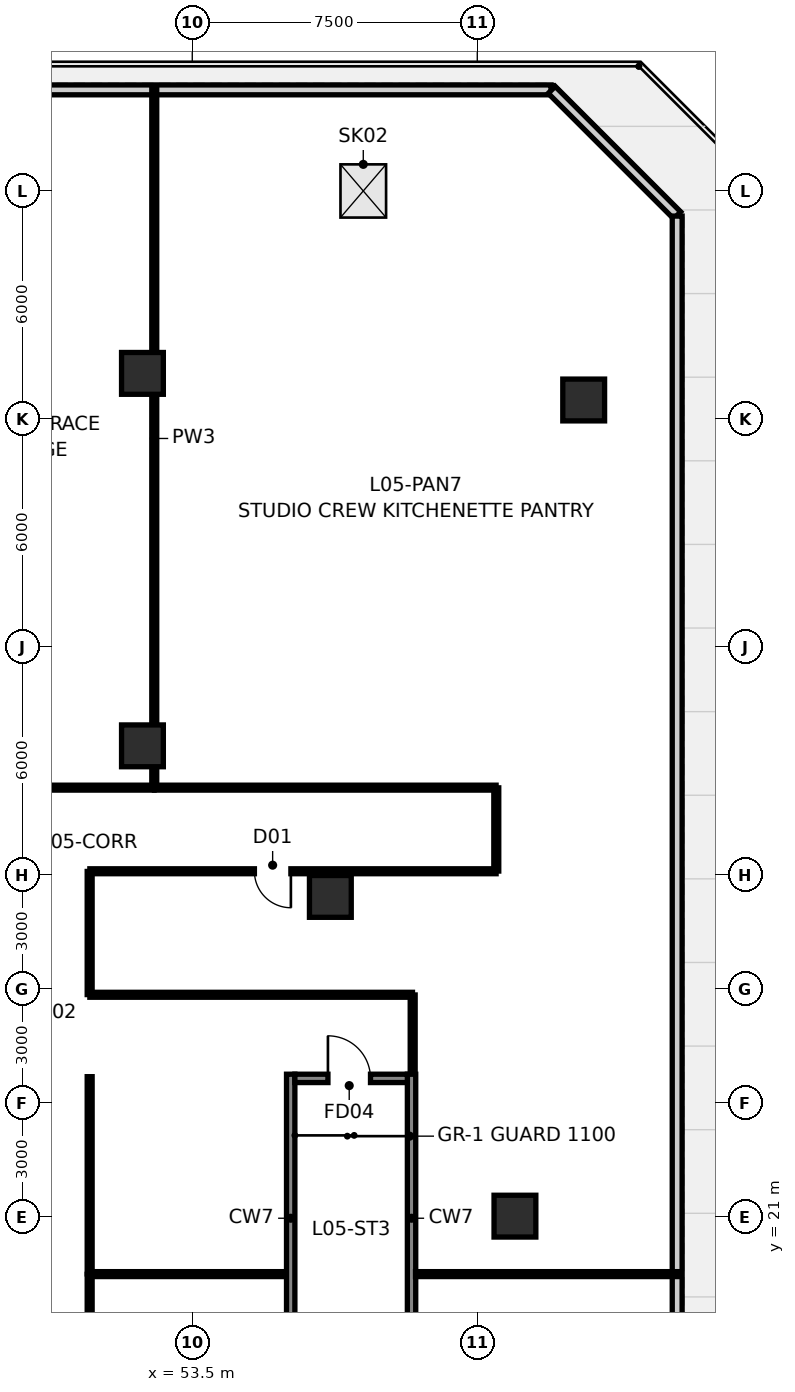
"""IFC4 building model, lengths in metres.
Left out: names, types, materials, properties, quantities, classifications, styles, units other than length and angle.
Written with IfcOpenShell. Run it as: python <this file> out.ifc"""

import sys

from ifc_helpers import new_model, si_unit, direction, frame, frame_2d, origin, origin_2d, place, context, subcontext, project, spatial, rectangle, hollow_rectangle, extrude, source, transform, mapped, element, fill, save


model = new_model("IFC4")
c1 = context("Model", 3, precision=1e-05, world=origin(), true_north=direction((0.0, 1.0)))
c2 = subcontext(c1, "Body", "Model", "MODEL_VIEW")
j1 = project(units=[si_unit("LENGTHUNIT", "METRE"), si_unit("PLANEANGLEUNIT", "RADIAN")], contexts=[c1])
p1 = place(None, origin())
s1 = spatial("IfcSite", under=j1, at=p1, CompositionType="ELEMENT")
p2 = place(p1, origin())
s2 = spatial("IfcBuilding", under=s1, at=p2, CompositionType="ELEMENT")
p3 = place(p2, frame((0.0, 0.0, 23.1)))
s3 = spatial("IfcBuildingStorey", under=s2, at=p3, CompositionType="ELEMENT", Elevation=23.1)
for number, where, z_axis, x_axis in (
    (1, (56.09, 17.18, 0.0), (0.0, 0.0, 1.0), (0.0, 1.0, 0.0)),
    (2, (59.27, 17.18, 0.0), (0.0, 0.0, 1.0), (0.0, 1.0, 0.0)),
):
    element("IfcWall", number, at=place(p3, frame(where, z_axis=z_axis, x_axis=x_axis)), inside=s3, PredefinedType="SHEAR", context=c2, shape_type="SweptSolid", body=[
        extrude(rectangle(XDim=7.58, YDim=0.22, at=frame_2d((3.79, 0.0))), origin(), (0.0, 0.0, 1.0), 4.5),
    ])
p4 = place(p3, frame((56.2, 24.65, 0.0), z_axis=(0.0, 0.0, 1.0), x_axis=(1.0, 0.0, 0.0)))
e3 = element("IfcWall", 3, at=p4, inside=s3, PredefinedType="SHEAR", context=c2, shape_type="SweptSolid", body=[
    extrude(rectangle(XDim=2.96, YDim=0.22, at=frame_2d((1.48, 0.0))), origin(), (0.0, 0.0, 1.0), 4.5),
])
p5 = place(p4, frame((0.87, 0.0, 0.0)))
e4 = element("IfcOpeningElement", 4, at=p5, cuts=e3, PredefinedType="OPENING", context=c2, shape_type="SweptSolid", body=[
    extrude(rectangle(XDim=1.12, YDim=2.15, at=frame_2d((0.56, 1.075))), frame((0.0, 0.122, 0.0), z_axis=(0.0, -1.0, 0.0), x_axis=(1.0, 0.0, 0.0)), (0.0, 0.0, 1.0), 0.244),
])
m1 = source(origin(), c2, "Body", "SweptSolid", [
    extrude(hollow_rectangle(XDim=1.1, YDim=1.1, WallThickness=0.06, at=origin_2d()), origin(), (0.0, 0.0, 1.0), 4.501),
])
p6 = place(p3, frame((61.991, 21.025, 0.0), z_axis=(-0.010413674417, -0.021586679261, 0.999712744074), x_axis=(0.900673807124, -0.434495906954, 0.0)))
e5 = element("IfcColumn", 5, at=p6, inside=s3, PredefinedType="COLUMN", context=c2, shape_type="MappedRepresentation", body=[
    mapped(m1, transform((0.0, 0.0, 0.0), scale=1.0)),
])
m2 = source(origin(), c2, "Body", "SweptSolid", [
    extrude(hollow_rectangle(XDim=1.1, YDim=1.1, WallThickness=0.06, at=origin_2d()), origin(), (0.0, 0.0, 1.0), 4.501),
])
p7 = place(p3, frame((57.134, 29.438, 0.0), z_axis=(-0.01491662865, -0.013777540644, 0.999793815526), x_axis=(0.678501966239, -0.734598585494, 0.0)))
e6 = element("IfcColumn", 6, at=p7, inside=s3, PredefinedType="COLUMN", context=c2, shape_type="MappedRepresentation", body=[
    mapped(m2, transform((0.0, 0.0, 0.0), scale=1.0)),
])
m3 = source(origin(), c2, "Body", "SweptSolid", [
    extrude(hollow_rectangle(XDim=1.1, YDim=1.1, WallThickness=0.06, at=origin_2d()), origin(), (0.0, 0.0, 1.0), 4.25),
])
for number, where, z_axis, x_axis in (
    (7, (52.189, 33.4, 0.0), (0.0, 0.0, 1.0), (1.0, 0.0, 0.0)),
    (8, (52.189, 43.2, 0.0), (0.0, 0.0, 1.0), (1.0, 0.0, 0.0)),
    (9, (63.8, 42.5, 0.0), (0.0, 0.0, 1.0), (1.0, 0.0, 0.0)),
):
    element("IfcColumn", number, at=place(p3, frame(where, z_axis=z_axis, x_axis=x_axis)), inside=s3, PredefinedType="COLUMN", context=c2, shape_type="MappedRepresentation", body=[
        mapped(m3, transform((0.0, 0.0, 0.0), scale=1.0)),
    ])
p8 = place(p3, frame((13.061, 50.66, 0.0), z_axis=(0.0, 0.0, 1.0), x_axis=(1.0, 0.0, 0.0)))
e10 = element("IfcWall", 10, at=p8, inside=s3, PredefinedType="STANDARD", context=c2, shape_type="SweptSolid", body=[
    extrude(rectangle(XDim=49.878, YDim=0.26, at=frame_2d((24.939, 0.0))), origin(), (0.0, 0.0, 1.0), 4.25),
])
p9 = place(p3, frame((62.959, 50.66, 0.0), z_axis=(0.0, 0.0, 1.0), x_axis=(0.707106781187, -0.707106781187, 0.0)))
e11 = element("IfcWall", 11, at=p9, inside=s3, PredefinedType="STANDARD", context=c2, shape_type="SweptSolid", body=[
    extrude(rectangle(XDim=4.668, YDim=0.26, at=frame_2d((2.334, 0.0))), origin(), (0.0, 0.0, 1.0), 4.25),
])
p10 = place(p3, frame((66.26, 47.339, 0.0), z_axis=(0.0, 0.0, 1.0), x_axis=(0.0, -1.0, 0.0)))
e12 = element("IfcWall", 12, at=p10, inside=s3, PredefinedType="STANDARD", context=c2, shape_type="SweptSolid", body=[
    extrude(rectangle(XDim=40.878, YDim=0.26, at=frame_2d((20.439, 0.0))), origin(), (0.0, 0.0, 1.0), 4.25),
])
p11 = place(p3, frame((52.5, 32.305, 0.0), z_axis=(0.0, 0.0, 1.0), x_axis=(0.0, 1.0, 0.0)))
e13 = element("IfcWall", 13, at=p11, inside=s3, PredefinedType="PARTITIONING", context=c2, shape_type="SweptSolid", body=[
    extrude(rectangle(XDim=18.365, YDim=0.13, at=frame_2d((9.183, 0.0))), origin(), (0.0, 0.0, 1.0), 2.435),
])
p12 = place(p3, frame((61.495, 30.1, 0.0), z_axis=(0.0, 0.0, 1.0), x_axis=(-1.0, 0.0, 0.0)))
e14 = element("IfcWall", 14, at=p12, inside=s3, PredefinedType="PARTITIONING", context=c2, shape_type="SweptSolid", body=[
    extrude(rectangle(XDim=10.69, YDim=0.13, at=frame_2d((5.345, 0.0))), origin(), (0.0, 0.0, 1.0), 3.623),
])
p13 = place(p12, frame((5.4, 0.0, 0.0)))
e15 = element("IfcOpeningElement", 15, at=p13, cuts=e14, PredefinedType="OPENING", context=c2, shape_type="SweptSolid", body=[
    extrude(rectangle(XDim=0.96, YDim=2.15, at=frame_2d((0.48, 1.075))), frame((0.0, 0.077, 0.0), z_axis=(0.0, -1.0, 0.0), x_axis=(1.0, 0.0, 0.0)), (0.0, 0.0, 1.0), 0.154),
])
p14 = place(p3, frame((52.505, 32.3, 0.0), z_axis=(0.0, 0.0, 1.0), x_axis=(1.0, 0.0, 0.0)))
e16 = element("IfcWall", 16, at=p14, inside=s3, PredefinedType="PARTITIONING", context=c2, shape_type="SweptSolid", body=[
    extrude(rectangle(XDim=8.99, YDim=0.13, at=frame_2d((4.495, 0.0))), origin(), (0.0, 0.0, 1.0), 4.25),
])
p15 = place(p3, frame((44.005, 32.3, 0.0), z_axis=(0.0, 0.0, 1.0), x_axis=(1.0, 0.0, 0.0)))
e17 = element("IfcWall", 17, at=p15, inside=s3, PredefinedType="PARTITIONING", context=c2, shape_type="SweptSolid", body=[
    extrude(rectangle(XDim=8.49, YDim=0.13, at=frame_2d((4.245, 0.0))), origin(), (0.0, 0.0, 1.0), 4.25),
])
p16 = place(p15, frame((3.765, 0.0, 0.0)))
e18 = element("IfcOpeningElement", 18, at=p16, cuts=e17, PredefinedType="OPENING", context=c2, shape_type="SweptSolid", body=[
    extrude(rectangle(XDim=0.96, YDim=2.15, at=frame_2d((0.48, 1.075))), frame((0.0, 0.077, 0.0), z_axis=(0.0, -1.0, 0.0), x_axis=(1.0, 0.0, 0.0)), (0.0, 0.0, 1.0), 0.154),
])
p17 = place(p3, frame((50.805, 26.85, 0.0), z_axis=(0.0, 0.0, 1.0), x_axis=(1.0, 0.0, 0.0)))
e19 = element("IfcWall", 19, at=p17, inside=s3, PredefinedType="PARTITIONING", context=c2, shape_type="SweptSolid", body=[
    extrude(rectangle(XDim=8.49, YDim=0.13, at=frame_2d((4.245, 0.0))), origin(), (0.0, 0.0, 1.0), 4.25),
])
p18 = place(p3, frame((50.8, 12.205, 0.0), z_axis=(0.0, 0.0, 1.0), x_axis=(0.0, 1.0, 0.0)))
e20 = element("IfcWall", 20, at=p18, inside=s3, PredefinedType="PARTITIONING", context=c2, shape_type="SweptSolid", body=[
    extrude(rectangle(XDim=7.29, YDim=0.13, at=frame_2d((3.645, 0.0))), origin(), (0.0, 0.0, 1.0), 4.25),
])
p19 = place(p18, frame((3.165, 0.0, 0.0)))
e21 = element("IfcOpeningElement", 21, at=p19, cuts=e20, PredefinedType="OPENING", context=c2, shape_type="SweptSolid", body=[
    extrude(rectangle(XDim=0.96, YDim=2.15, at=frame_2d((0.48, 1.075))), frame((0.0, 0.077, 0.0), z_axis=(0.0, -1.0, 0.0), x_axis=(1.0, 0.0, 0.0)), (0.0, 0.0, 1.0), 0.154),
])
p20 = place(p3, frame((59.375, 19.5, 0.0), z_axis=(0.0, 0.0, 1.0), x_axis=(1.0, 0.0, 0.0)))
e22 = element("IfcWall", 22, at=p20, inside=s3, PredefinedType="PARTITIONING", context=c2, shape_type="SweptSolid", body=[
    extrude(rectangle(XDim=6.895, YDim=0.13, at=frame_2d((3.448, 0.0))), origin(), (0.0, 0.0, 1.0), 4.25),
])
p21 = place(p3, frame((50.805, 19.5, 0.0), z_axis=(0.0, 0.0, 1.0), x_axis=(1.0, 0.0, 0.0)))
e23 = element("IfcWall", 23, at=p21, inside=s3, PredefinedType="PARTITIONING", context=c2, shape_type="SweptSolid", body=[
    extrude(rectangle(XDim=5.17, YDim=0.13, at=frame_2d((2.585, 0.0))), origin(), (0.0, 0.0, 1.0), 4.25),
])
p22 = place(p3, frame((50.8, 24.695, 0.0), z_axis=(0.0, 0.0, 1.0), x_axis=(0.0, -1.0, 0.0)))
e24 = element("IfcWall", 24, at=p22, inside=s3, PredefinedType="PARTITIONING", context=c2, shape_type="SweptSolid", body=[
    extrude(rectangle(XDim=5.19, YDim=0.13, at=frame_2d((2.595, 0.0))), origin(), (0.0, 0.0, 1.0), 4.25),
])
p23 = place(p3, frame((50.8, 30.095, 0.0), z_axis=(0.0, 0.0, 1.0), x_axis=(0.0, -1.0, 0.0)))
e25 = element("IfcWall", 25, at=p23, inside=s3, PredefinedType="PARTITIONING", context=c2, shape_type="SweptSolid", body=[
    extrude(rectangle(XDim=3.24, YDim=0.13, at=frame_2d((1.62, 0.0))), origin(), (0.0, 0.0, 1.0), 4.25),
])
p24 = place(p3, frame((61.5, 32.295, 0.0), z_axis=(0.0, 0.0, 1.0), x_axis=(0.0, -1.0, 0.0)))
e26 = element("IfcWall", 26, at=p24, inside=s3, PredefinedType="PARTITIONING", context=c2, shape_type="SweptSolid", body=[
    extrude(rectangle(XDim=2.19, YDim=0.13, at=frame_2d((1.095, 0.0))), origin(), (0.0, 0.0, 1.0), 4.25),
])
p25 = place(p3, frame((59.3, 26.845, 0.0), z_axis=(0.0, 0.0, 1.0), x_axis=(0.0, -1.0, 0.0)))
e27 = element("IfcWall", 27, at=p25, inside=s3, PredefinedType="PARTITIONING", context=c2, shape_type="SweptSolid", body=[
    extrude(rectangle(XDim=2.07, YDim=0.13, at=frame_2d((1.035, 0.0))), origin(), (0.0, 0.0, 1.0), 4.25),
])
p26 = place(p3, frame((0.0, 0.0, -0.45)))
p27 = place(p26, frame((58.0, 48.0, 0.0)))
p28 = place(p27, frame((0.0, 0.0, 0.4)))
e28 = element("IfcWindow", 28, at=p28, inside=s3, PartitioningType="SINGLE_PANEL", PredefinedType="SKYLIGHT", context=c2, shape_type="SweptSolid", body=[
    extrude(rectangle(XDim=1.2, YDim=1.4, at=origin_2d()), origin(), (0.0, 0.0, 1.0), 0.05),
])
p29 = place(p5, origin())
e29 = element("IfcDoor", 29, at=p29, inside=s3, OperationType="SINGLE_SWING_LEFT", PredefinedType="DOOR", context=c2, shape_type="SweptSolid", body=[
    extrude(rectangle(XDim=1.12, YDim=2.15, at=frame_2d((0.56, 1.075))), frame((0.0, 0.025, 0.0), z_axis=(0.0, -1.0, 0.0), x_axis=(1.0, 0.0, 0.0)), (0.0, 0.0, 1.0), 0.05),
])
fill(e4, e29)
p30 = place(p13, origin())
e30 = element("IfcDoor", 30, at=p30, inside=s3, OperationType="SINGLE_SWING_LEFT", PredefinedType="DOOR", context=c2, shape_type="SweptSolid", body=[
    extrude(rectangle(XDim=0.96, YDim=2.15, at=frame_2d((0.48, 1.075))), frame((0.0, 0.025, 0.0), z_axis=(0.0, -1.0, 0.0), x_axis=(1.0, 0.0, 0.0)), (0.0, 0.0, 1.0), 0.05),
])
fill(e15, e30)
save(model, sys.argv[1])
